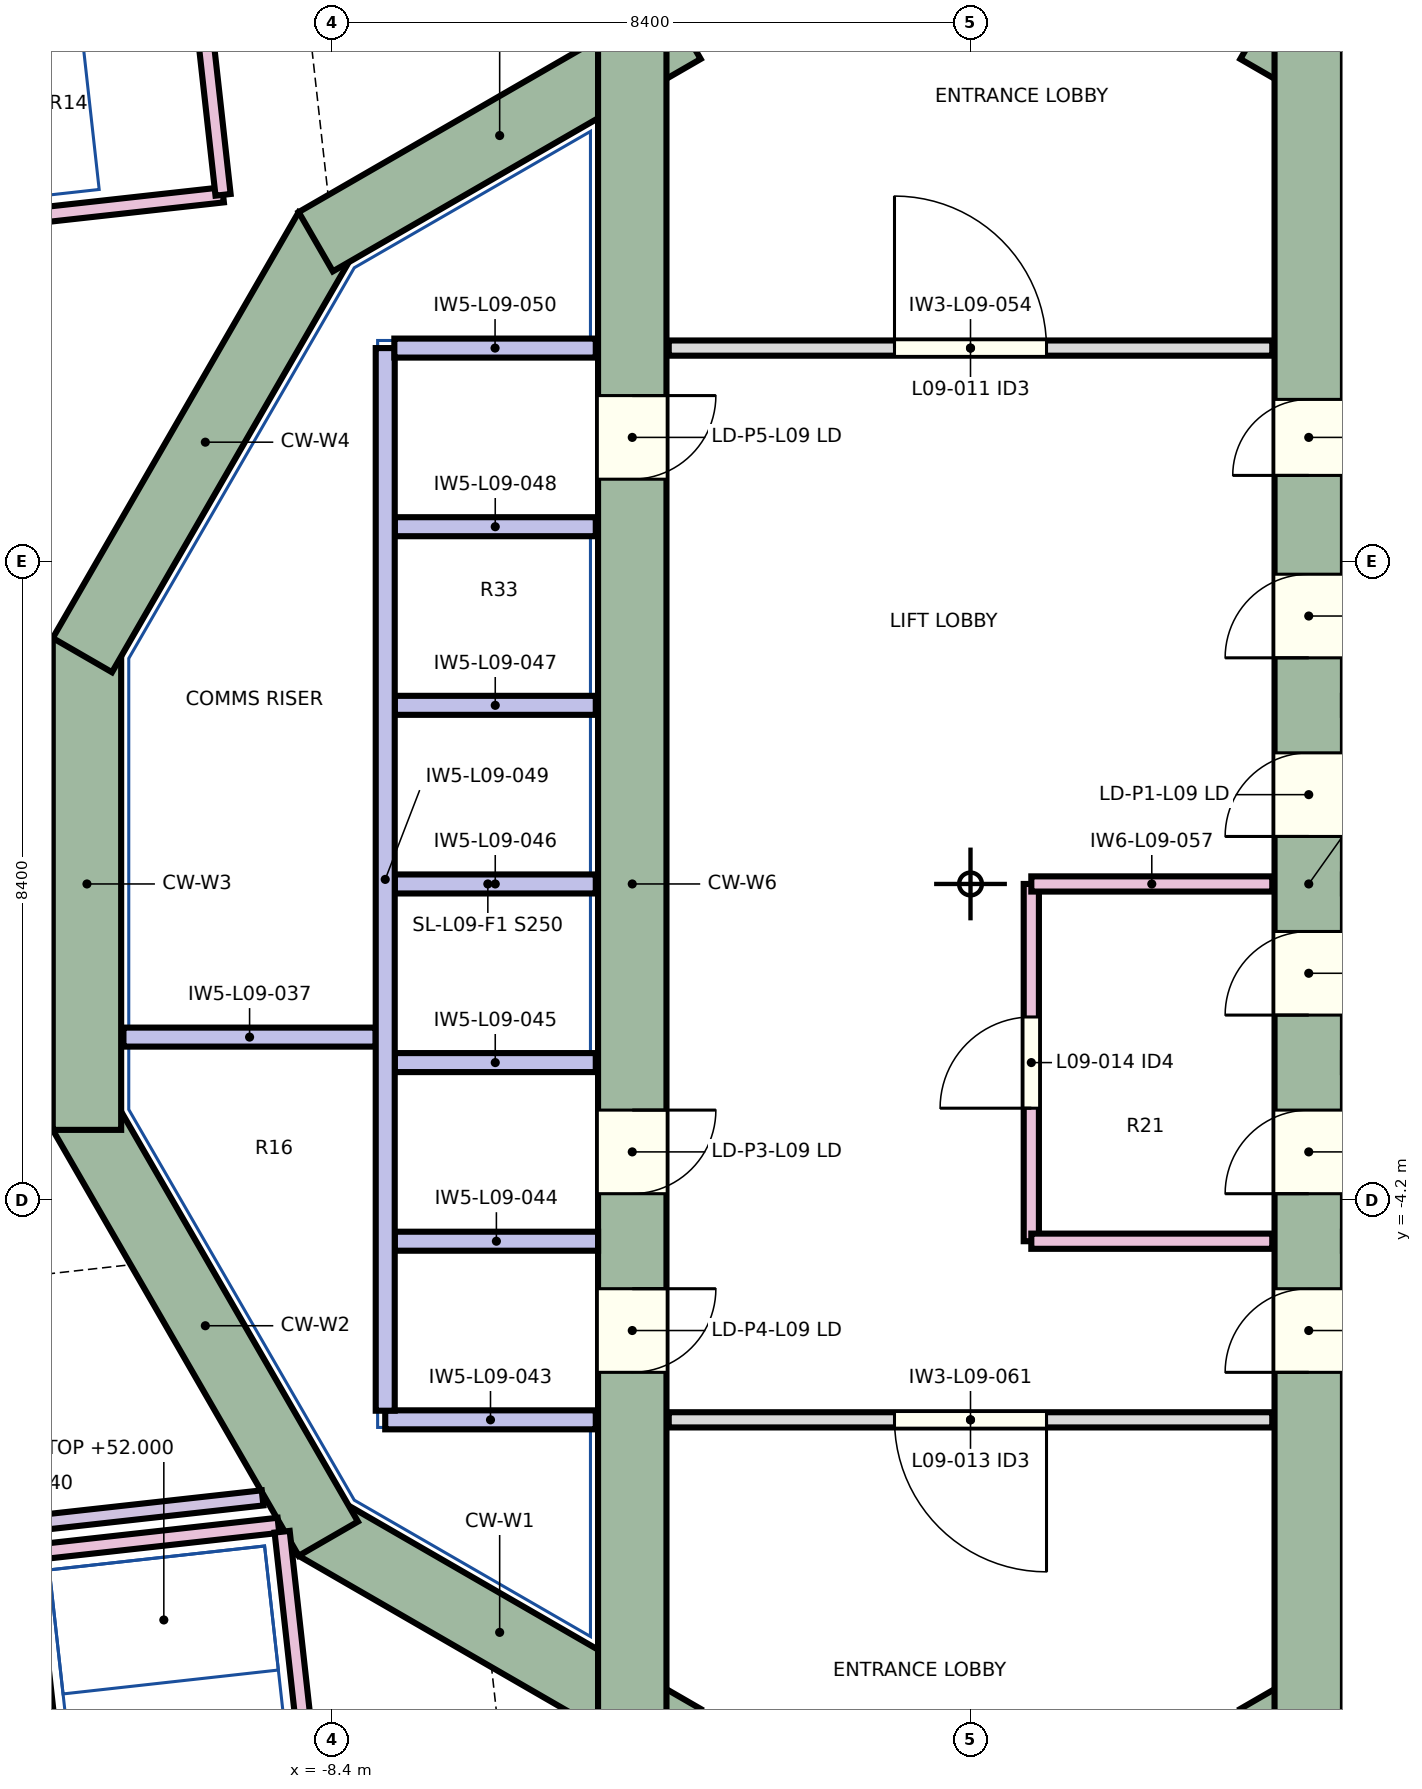
"""IFC4 building model, lengths in metres.
Left out: names, types, materials, properties, quantities, classifications, styles, units other than length and angle.
Written with IfcOpenShell. Run it as: python <this file> out.ifc"""

import sys

from ifc_helpers import new_model, si_unit, direction, frame, frame_2d, origin, place, context, subcontext, project, spatial, rectangle, extrude, element, fill, save


model = new_model("IFC4")
c1 = context("Model", 3, precision=1e-05, world=origin(), true_north=direction((0.0, 1.0)))
c2 = subcontext(c1, "Body", "Model", "MODEL_VIEW")
j1 = project(units=[si_unit("LENGTHUNIT", "METRE"), si_unit("PLANEANGLEUNIT", "RADIAN")], contexts=[c1])
p1 = place(None, origin())
s1 = spatial("IfcSite", under=j1, at=p1, CompositionType="ELEMENT")
p2 = place(p1, origin())
s2 = spatial("IfcBuilding", under=s1, at=p2, CompositionType="ELEMENT")
p3 = place(p2, frame((0.0, 0.0, 50.1)))
s3 = spatial("IfcBuildingStorey", under=s2, at=p3, CompositionType="ELEMENT", Elevation=50.1)
p4 = place(p3, frame((-3.775, -11.243, 0.0), z_axis=(0.0, 0.0, 1.0), x_axis=(-0.866026961591, 0.49999730179, 0.0)))
e1 = element("IfcWall", 1, at=p4, inside=s3, PredefinedType="SHEAR", context=c2, shape_type="SweptSolid", body=[
    extrude(rectangle(XDim=5.587, YDim=0.9, at=frame_2d((2.794, 0.0))), origin(), (0.0, 0.0, 1.0), 3.8),
])
p5 = place(p3, frame((-8.449, -8.614, 0.0), z_axis=(0.0, 0.0, 1.0), x_axis=(-0.499990282633, 0.866031014036, 0.0)))
e2 = element("IfcWall", 2, at=p5, inside=s3, PredefinedType="SHEAR", context=c2, shape_type="SweptSolid", body=[
    extrude(rectangle(XDim=6.47, YDim=0.9, at=frame_2d((3.235, 0.0))), origin(), (0.0, 0.0, 1.0), 3.8),
])
p6 = place(p3, frame((-11.624, -3.235, 0.0), z_axis=(0.0, 0.0, 1.0), x_axis=(0.0, 1.0, 0.0)))
e3 = element("IfcWall", 3, at=p6, inside=s3, PredefinedType="SHEAR", context=c2, shape_type="SweptSolid", body=[
    extrude(rectangle(XDim=6.471, YDim=0.9, at=frame_2d((3.235, 0.0))), origin(), (0.0, 0.0, 1.0), 3.8),
])
p7 = place(p3, frame((-11.684, 3.01, 0.0), z_axis=(0.0, 0.0, 1.0), x_axis=(0.499990282633, 0.866031014036, 0.0)))
e4 = element("IfcWall", 4, at=p7, inside=s3, PredefinedType="SHEAR", context=c2, shape_type="SweptSolid", body=[
    extrude(rectangle(XDim=6.47, YDim=0.9, at=frame_2d((3.235, 0.0))), origin(), (0.0, 0.0, 1.0), 3.8),
])
p8 = place(p3, frame((-8.614, 8.449, 0.0), z_axis=(0.0, 0.0, 1.0), x_axis=(0.866026961591, 0.49999730179, 0.0)))
e5 = element("IfcWall", 5, at=p8, inside=s3, PredefinedType="SHEAR", context=c2, shape_type="SweptSolid", body=[
    extrude(rectangle(XDim=5.587, YDim=0.9, at=frame_2d((2.794, 0.0))), origin(), (0.0, 0.0, 1.0), 3.8),
])
p9 = place(p3, frame((-4.45, 11.633, 0.0), z_axis=(0.0, 0.0, 1.0), x_axis=(0.0, -1.0, 0.0)))
e6 = element("IfcWall", 6, at=p9, inside=s3, PredefinedType="SHEAR", context=c2, shape_type="SweptSolid", body=[
    extrude(rectangle(XDim=23.265, YDim=0.9, at=frame_2d((11.633, 0.0))), origin(), (0.0, 0.0, 1.0), 3.8),
])
p10 = place(p9, frame((14.607, 0.0, 0.0)))
e7 = element("IfcOpeningElement", 7, at=p10, cuts=e6, PredefinedType="OPENING", context=c2, shape_type="SweptSolid", body=[
    extrude(rectangle(XDim=1.1, YDim=2.1, at=frame_2d((0.55, 1.05))), frame((0.0, 0.46, 0.0), z_axis=(0.0, -1.0, 0.0), x_axis=(1.0, 0.0, 0.0)), (0.0, 0.0, 1.0), 0.92),
])
p11 = place(p9, frame((16.958, 0.0, 0.0)))
e8 = element("IfcOpeningElement", 8, at=p11, cuts=e6, PredefinedType="OPENING", context=c2, shape_type="SweptSolid", body=[
    extrude(rectangle(XDim=1.1, YDim=2.1, at=frame_2d((0.55, 1.05))), frame((0.0, 0.46, 0.0), z_axis=(0.0, -1.0, 0.0), x_axis=(1.0, 0.0, 0.0)), (0.0, 0.0, 1.0), 0.92),
])
p12 = place(p9, frame((5.208, 0.0, 0.0)))
e9 = element("IfcOpeningElement", 9, at=p12, cuts=e6, PredefinedType="OPENING", context=c2, shape_type="SweptSolid", body=[
    extrude(rectangle(XDim=1.1, YDim=2.1, at=frame_2d((0.55, 1.05))), frame((0.0, 0.46, 0.0), z_axis=(0.0, -1.0, 0.0), x_axis=(1.0, 0.0, 0.0)), (0.0, 0.0, 1.0), 0.92),
])
for number, where, z_axis, x_axis in (
    (10, (3.775, 11.243, 0.0), (0.0, 0.0, 1.0), (0.866, -0.5, 0.0)),
    (11, (8.614, -8.449, 0.0), (0.0, 0.0, 1.0), (-0.866, -0.5, 0.0)),
):
    element("IfcWall", number, at=place(p3, frame(where, z_axis=z_axis, x_axis=x_axis)), inside=s3, PredefinedType="SHEAR", context=c2, shape_type="SweptSolid", body=[
        extrude(rectangle(XDim=5.587, YDim=0.9, at=frame_2d((2.794, 0.0))), origin(), (0.0, 0.0, 1.0), 3.8),
    ])
p13 = place(p3, frame((4.45, -11.633, 0.0), z_axis=(0.0, 0.0, 1.0), x_axis=(0.0, 1.0, 0.0)))
e12 = element("IfcWall", 12, at=p13, inside=s3, PredefinedType="SHEAR", context=c2, shape_type="SweptSolid", body=[
    extrude(rectangle(XDim=23.265, YDim=0.9, at=frame_2d((11.633, 0.0))), origin(), (0.0, 0.0, 1.0), 3.8),
])
p14 = place(p13, frame((7.558, 0.0, 0.0)))
e13 = element("IfcOpeningElement", 13, at=p14, cuts=e12, PredefinedType="OPENING", context=c2, shape_type="SweptSolid", body=[
    extrude(rectangle(XDim=1.1, YDim=2.1, at=frame_2d((0.55, 1.05))), frame((0.0, 0.46, 0.0), z_axis=(0.0, -1.0, 0.0), x_axis=(1.0, 0.0, 0.0)), (0.0, 0.0, 1.0), 0.92),
])
p15 = place(p13, frame((9.907, 0.0, 0.0)))
e14 = element("IfcOpeningElement", 14, at=p15, cuts=e12, PredefinedType="OPENING", context=c2, shape_type="SweptSolid", body=[
    extrude(rectangle(XDim=1.1, YDim=2.1, at=frame_2d((0.55, 1.05))), frame((0.0, 0.46, 0.0), z_axis=(0.0, -1.0, 0.0), x_axis=(1.0, 0.0, 0.0)), (0.0, 0.0, 1.0), 0.92),
])
p16 = place(p13, frame((12.258, 0.0, 0.0)))
e15 = element("IfcOpeningElement", 15, at=p16, cuts=e12, PredefinedType="OPENING", context=c2, shape_type="SweptSolid", body=[
    extrude(rectangle(XDim=1.1, YDim=2.1, at=frame_2d((0.55, 1.05))), frame((0.0, 0.46, 0.0), z_axis=(0.0, -1.0, 0.0), x_axis=(1.0, 0.0, 0.0)), (0.0, 0.0, 1.0), 0.92),
])
p17 = place(p13, frame((14.607, 0.0, 0.0)))
e16 = element("IfcOpeningElement", 16, at=p17, cuts=e12, PredefinedType="OPENING", context=c2, shape_type="SweptSolid", body=[
    extrude(rectangle(XDim=1.1, YDim=2.1, at=frame_2d((0.55, 1.05))), frame((0.0, 0.46, 0.0), z_axis=(0.0, -1.0, 0.0), x_axis=(1.0, 0.0, 0.0)), (0.0, 0.0, 1.0), 0.92),
])
p18 = place(p13, frame((5.208, 0.0, 0.0)))
e17 = element("IfcOpeningElement", 17, at=p18, cuts=e12, PredefinedType="OPENING", context=c2, shape_type="SweptSolid", body=[
    extrude(rectangle(XDim=1.1, YDim=2.1, at=frame_2d((0.55, 1.05))), frame((0.0, 0.46, 0.0), z_axis=(0.0, -1.0, 0.0), x_axis=(1.0, 0.0, 0.0)), (0.0, 0.0, 1.0), 0.92),
])
p19 = place(p13, frame((17.008, 0.0, 0.0)))
e18 = element("IfcOpeningElement", 18, at=p19, cuts=e12, PredefinedType="OPENING", context=c2, shape_type="SweptSolid", body=[
    extrude(rectangle(XDim=1.0, YDim=2.1, at=frame_2d((0.5, 1.05))), frame((0.0, 0.46, 0.0), z_axis=(0.0, -1.0, 0.0), x_axis=(1.0, 0.0, 0.0)), (0.0, 0.0, 1.0), 0.92),
])
p20 = place(p3, frame((-15.797, 8.404, 0.0), z_axis=(0.0, 0.0, 1.0), x_axis=(0.993897125329, 0.110310943534, 0.0)))
e19 = element("IfcWall", 19, at=p20, inside=s3, PredefinedType="SOLIDWALL", context=c2, shape_type="SweptSolid", body=[
    extrude(rectangle(XDim=6.0, YDim=0.2, at=frame_2d((3.0, 0.0))), origin(), (0.0, 0.0, 1.0), 3.55),
])
p21 = place(p3, frame((-12.396, -8.803, 0.0), z_axis=(0.0, 0.0, 1.0), x_axis=(0.110335171461, -0.993894436014, 0.0)))
e20 = element("IfcWall", 20, at=p21, inside=s3, PredefinedType="SOLIDWALL", context=c2, shape_type="SweptSolid", body=[
    extrude(rectangle(XDim=6.118, YDim=0.2, at=frame_2d((3.059, 0.0))), origin(), (0.0, 0.0, 1.0), 3.55),
])
p22 = place(p3, frame((-12.396, -8.803, 0.0), z_axis=(0.0, 0.0, 1.0), x_axis=(0.993897215684, 0.110310129436, 0.0)))
e21 = element("IfcWall", 21, at=p22, inside=s3, PredefinedType="SOLIDWALL", context=c2, shape_type="SweptSolid", body=[
    extrude(rectangle(XDim=3.311, YDim=0.2, at=frame_2d((1.656, 0.0))), origin(), (0.0, 0.0, 1.0), 3.55),
])
p23 = place(p3, frame((-11.144, -2.015, 0.0), z_axis=(0.0, 0.0, 1.0), x_axis=(1.0, 0.0, 0.0)))
e22 = element("IfcWall", 22, at=p23, inside=s3, PredefinedType="SOLIDWALL", context=c2, shape_type="SweptSolid", body=[
    extrude(rectangle(XDim=3.319, YDim=0.25, at=frame_2d((1.66, 0.0))), origin(), (0.0, 0.0, 1.0), 3.55),
])
p24 = place(p3, frame((-9.833, 9.066, 0.0), z_axis=(0.0, 0.0, 1.0), x_axis=(-0.110297715324, 0.993898593416, 0.0)))
e23 = element("IfcWall", 23, at=p24, inside=s3, PredefinedType="SOLIDWALL", context=c2, shape_type="SweptSolid", body=[
    extrude(rectangle(XDim=3.404, YDim=0.2, at=frame_2d((1.702, 0.0))), origin(), (0.0, 0.0, 1.0), 3.55),
])
p25 = place(p3, frame((-9.313, -8.077, 0.0), z_axis=(0.0, 0.0, 1.0), x_axis=(-0.993896259816, -0.110318741489, 0.0)))
e24 = element("IfcWall", 24, at=p25, inside=s3, PredefinedType="PARTITIONING", context=c2, shape_type="SweptSolid", body=[
    extrude(rectangle(XDim=6.652, YDim=0.2, at=frame_2d((3.326, 0.0))), origin(), (0.0, 0.0, 1.0), 3.55),
])
p26 = place(p3, frame((-8.391, -14.514, 0.0), z_axis=(0.0, 0.0, 1.0), x_axis=(-0.11031151838, 0.993897061527, 0.0)))
e25 = element("IfcWall", 25, at=p26, inside=s3, PredefinedType="SOLIDWALL", context=c2, shape_type="SweptSolid", body=[
    extrude(rectangle(XDim=6.029, YDim=0.2, at=frame_2d((3.014, 0.0))), origin(), (0.0, 0.0, 1.0), 3.55),
])
p27 = place(p3, frame((-7.7, -7.05, 0.0), z_axis=(0.0, 0.0, 1.0), x_axis=(1.0, 0.0, 0.0)))
e26 = element("IfcWall", 26, at=p27, inside=s3, PredefinedType="SOLIDWALL", context=c2, shape_type="SweptSolid", body=[
    extrude(rectangle(XDim=2.77, YDim=0.25, at=frame_2d((1.385, 0.0))), origin(), (0.0, 0.0, 1.0), 3.55),
])
p28 = place(p3, frame((-7.575, -4.7, 0.0), z_axis=(0.0, 0.0, 1.0), x_axis=(1.0, 0.0, 0.0)))
e27 = element("IfcWall", 27, at=p28, inside=s3, PredefinedType="SOLIDWALL", context=c2, shape_type="SweptSolid", body=[
    extrude(rectangle(XDim=2.675, YDim=0.25, at=frame_2d((1.337, 0.0))), origin(), (0.0, 0.0, 1.0), 3.55),
])
for number, where, z_axis, x_axis in (
    (28, (-7.575, -2.35, 0.0), (0.0, 0.0, 1.0), (1.0, 0.0, 0.0)),
    (29, (-7.575, 0.0, 0.0), (0.0, 0.0, 1.0), (1.0, 0.0, 0.0)),
    (30, (-7.575, 2.35, 0.0), (0.0, 0.0, 1.0), (1.0, 0.0, 0.0)),
    (31, (-7.575, 4.7, 0.0), (0.0, 0.0, 1.0), (1.0, 0.0, 0.0)),
):
    element("IfcWall", number, at=place(p3, frame(where, z_axis=z_axis, x_axis=x_axis)), inside=s3, PredefinedType="SOLIDWALL", context=c2, shape_type="SweptSolid", body=[
        extrude(rectangle(XDim=2.645, YDim=0.25, at=frame_2d((1.323, 0.0))), origin(), (0.0, 0.0, 1.0), 3.55),
    ])
p29 = place(p3, frame((-7.7, 7.05, 0.0), z_axis=(0.0, 0.0, 1.0), x_axis=(0.0, -1.0, 0.0)))
e32 = element("IfcWall", 32, at=p29, inside=s3, PredefinedType="SOLIDWALL", context=c2, shape_type="SweptSolid", body=[
    extrude(rectangle(XDim=13.98, YDim=0.25, at=frame_2d((6.99, 0.0))), origin(), (0.0, 0.0, 1.0), 3.55),
])
p30 = place(p3, frame((-4.93, 7.05, 0.0), z_axis=(0.0, 0.0, 1.0), x_axis=(-1.0, 0.0, 0.0)))
e33 = element("IfcWall", 33, at=p30, inside=s3, PredefinedType="SOLIDWALL", context=c2, shape_type="SweptSolid", body=[
    extrude(rectangle(XDim=2.65, YDim=0.25, at=frame_2d((1.325, 0.0))), origin(), (0.0, 0.0, 1.0), 3.55),
])
p31 = place(p3, frame((-3.97, 7.05, 0.0), z_axis=(0.0, 0.0, 1.0), x_axis=(1.0, 0.0, 0.0)))
e34 = element("IfcWall", 34, at=p31, inside=s3, PredefinedType="PARTITIONING", context=c2, shape_type="SweptSolid", body=[
    extrude(rectangle(XDim=7.94, YDim=0.2, at=frame_2d((3.97, 0.0))), origin(), (0.0, 0.0, 1.0), 3.55),
])
p32 = place(p31, frame((2.97, 0.0, 0.0)))
e35 = element("IfcOpeningElement", 35, at=p32, cuts=e34, PredefinedType="OPENING", context=c2, shape_type="SweptSolid", body=[
    extrude(rectangle(XDim=2.0, YDim=2.1, at=frame_2d((1.0, 1.05))), frame((0.0, 0.11, 0.0), z_axis=(0.0, -1.0, 0.0), x_axis=(1.0, 0.0, 0.0)), (0.0, 0.0, 1.0), 0.22),
])
p33 = place(p3, frame((0.8, -4.7, 0.0), z_axis=(0.0, 0.0, 1.0), x_axis=(0.0, 1.0, 0.0)))
e36 = element("IfcWall", 36, at=p33, inside=s3, PredefinedType="SOLIDWALL", context=c2, shape_type="SweptSolid", body=[
    extrude(rectangle(XDim=4.7, YDim=0.2, at=frame_2d((2.35, 0.0))), origin(), (0.0, 0.0, 1.0), 3.55),
])
p34 = place(p33, frame((1.75, 0.0, 0.0)))
e37 = element("IfcOpeningElement", 37, at=p34, cuts=e36, PredefinedType="OPENING", context=c2, shape_type="SweptSolid", body=[
    extrude(rectangle(XDim=1.2, YDim=2.1, at=frame_2d((0.6, 1.05))), frame((0.0, 0.11, 0.0), z_axis=(0.0, -1.0, 0.0), x_axis=(1.0, 0.0, 0.0)), (0.0, 0.0, 1.0), 0.22),
])
p35 = place(p3, frame((0.8, 0.0, 0.0), z_axis=(0.0, 0.0, 1.0), x_axis=(1.0, 0.0, 0.0)))
e38 = element("IfcWall", 38, at=p35, inside=s3, PredefinedType="SOLIDWALL", context=c2, shape_type="SweptSolid", body=[
    extrude(rectangle(XDim=3.17, YDim=0.2, at=frame_2d((1.585, 0.0))), origin(), (0.0, 0.0, 1.0), 3.55),
])
p36 = place(p3, frame((3.97, -7.05, 0.0), z_axis=(0.0, 0.0, 1.0), x_axis=(-1.0, 0.0, 0.0)))
e39 = element("IfcWall", 39, at=p36, inside=s3, PredefinedType="PARTITIONING", context=c2, shape_type="SweptSolid", body=[
    extrude(rectangle(XDim=7.94, YDim=0.2, at=frame_2d((3.97, 0.0))), origin(), (0.0, 0.0, 1.0), 3.55),
])
p37 = place(p36, frame((2.97, 0.0, 0.0)))
e40 = element("IfcOpeningElement", 40, at=p37, cuts=e39, PredefinedType="OPENING", context=c2, shape_type="SweptSolid", body=[
    extrude(rectangle(XDim=2.0, YDim=2.1, at=frame_2d((1.0, 1.05))), frame((0.0, 0.11, 0.0), z_axis=(0.0, -1.0, 0.0), x_axis=(1.0, 0.0, 0.0)), (0.0, 0.0, 1.0), 0.22),
])
p38 = place(p3, frame((3.97, -4.7, 0.0), z_axis=(0.0, 0.0, 1.0), x_axis=(-1.0, 0.0, 0.0)))
e41 = element("IfcWall", 41, at=p38, inside=s3, PredefinedType="SOLIDWALL", context=c2, shape_type="SweptSolid", body=[
    extrude(rectangle(XDim=3.17, YDim=0.2, at=frame_2d((1.585, 0.0))), origin(), (0.0, 0.0, 1.0), 3.55),
])
for number, where, z_axis, x_axis in (
    (42, (4.9, -4.7, 0.0), (0.0, 0.0, 1.0), (1.0, 0.0, 0.0)),
    (43, (4.9, 0.0, 0.0), (0.0, 0.0, 1.0), (1.0, 0.0, 0.0)),
):
    element("IfcWall", number, at=place(p3, frame(where, z_axis=z_axis, x_axis=x_axis)), inside=s3, PredefinedType="SOLIDWALL", context=c2, shape_type="SweptSolid", body=[
        extrude(rectangle(XDim=2.675, YDim=0.25, at=frame_2d((1.337, 0.0))), origin(), (0.0, 0.0, 1.0), 3.55),
    ])
p39 = place(p32, origin())
e44 = element("IfcDoor", 44, at=p39, inside=s3, OperationType="NOTDEFINED", PredefinedType="DOOR", context=c2, shape_type="SweptSolid", body=[
    extrude(rectangle(XDim=2.0, YDim=2.1, at=frame_2d((1.0, 1.05))), frame((0.0, 0.025, 0.0), z_axis=(0.0, -1.0, 0.0), x_axis=(1.0, 0.0, 0.0)), (0.0, 0.0, 1.0), 0.05),
])
fill(e35, e44)
p40 = place(p37, origin())
e45 = element("IfcDoor", 45, at=p40, inside=s3, OperationType="NOTDEFINED", PredefinedType="DOOR", context=c2, shape_type="SweptSolid", body=[
    extrude(rectangle(XDim=2.0, YDim=2.1, at=frame_2d((1.0, 1.05))), frame((0.0, 0.025, 0.0), z_axis=(0.0, -1.0, 0.0), x_axis=(1.0, 0.0, 0.0)), (0.0, 0.0, 1.0), 0.05),
])
fill(e40, e45)
p41 = place(p34, origin())
e46 = element("IfcDoor", 46, at=p41, inside=s3, OperationType="NOTDEFINED", PredefinedType="DOOR", context=c2, shape_type="SweptSolid", body=[
    extrude(rectangle(XDim=1.2, YDim=2.1, at=frame_2d((0.6, 1.05))), frame((0.0, 0.025, 0.0), z_axis=(0.0, -1.0, 0.0), x_axis=(1.0, 0.0, 0.0)), (0.0, 0.0, 1.0), 0.05),
])
fill(e37, e46)
p42 = place(p14, origin())
e47 = element("IfcDoor", 47, at=p42, inside=s3, OperationType="SLIDING_TO_LEFT", PredefinedType="DOOR", context=c2, shape_type="SweptSolid", body=[
    extrude(rectangle(XDim=1.1, YDim=2.1, at=frame_2d((0.55, 1.05))), frame((0.0, 0.025, 0.0), z_axis=(0.0, -1.0, 0.0), x_axis=(1.0, 0.0, 0.0)), (0.0, 0.0, 1.0), 0.05),
])
fill(e13, e47)
p43 = place(p15, origin())
e48 = element("IfcDoor", 48, at=p43, inside=s3, OperationType="SLIDING_TO_LEFT", PredefinedType="DOOR", context=c2, shape_type="SweptSolid", body=[
    extrude(rectangle(XDim=1.1, YDim=2.1, at=frame_2d((0.55, 1.05))), frame((0.0, 0.025, 0.0), z_axis=(0.0, -1.0, 0.0), x_axis=(1.0, 0.0, 0.0)), (0.0, 0.0, 1.0), 0.05),
])
fill(e14, e48)
p44 = place(p16, origin())
e49 = element("IfcDoor", 49, at=p44, inside=s3, OperationType="SLIDING_TO_LEFT", PredefinedType="DOOR", context=c2, shape_type="SweptSolid", body=[
    extrude(rectangle(XDim=1.1, YDim=2.1, at=frame_2d((0.55, 1.05))), frame((0.0, 0.025, 0.0), z_axis=(0.0, -1.0, 0.0), x_axis=(1.0, 0.0, 0.0)), (0.0, 0.0, 1.0), 0.05),
])
fill(e15, e49)
p45 = place(p17, origin())
e50 = element("IfcDoor", 50, at=p45, inside=s3, OperationType="SLIDING_TO_LEFT", PredefinedType="DOOR", context=c2, shape_type="SweptSolid", body=[
    extrude(rectangle(XDim=1.1, YDim=2.1, at=frame_2d((0.55, 1.05))), frame((0.0, 0.025, 0.0), z_axis=(0.0, -1.0, 0.0), x_axis=(1.0, 0.0, 0.0)), (0.0, 0.0, 1.0), 0.05),
])
fill(e16, e50)
p46 = place(p10, origin())
e51 = element("IfcDoor", 51, at=p46, inside=s3, OperationType="SLIDING_TO_LEFT", PredefinedType="DOOR", context=c2, shape_type="SweptSolid", body=[
    extrude(rectangle(XDim=1.1, YDim=2.1, at=frame_2d((0.55, 1.05))), frame((0.0, 0.025, 0.0), z_axis=(0.0, -1.0, 0.0), x_axis=(1.0, 0.0, 0.0)), (0.0, 0.0, 1.0), 0.05),
])
fill(e7, e51)
p47 = place(p11, origin())
e52 = element("IfcDoor", 52, at=p47, inside=s3, OperationType="SLIDING_TO_LEFT", PredefinedType="DOOR", context=c2, shape_type="SweptSolid", body=[
    extrude(rectangle(XDim=1.1, YDim=2.1, at=frame_2d((0.55, 1.05))), frame((0.0, 0.025, 0.0), z_axis=(0.0, -1.0, 0.0), x_axis=(1.0, 0.0, 0.0)), (0.0, 0.0, 1.0), 0.05),
])
fill(e8, e52)
p48 = place(p12, origin())
e53 = element("IfcDoor", 53, at=p48, inside=s3, OperationType="SLIDING_TO_LEFT", PredefinedType="DOOR", context=c2, shape_type="SweptSolid", body=[
    extrude(rectangle(XDim=1.1, YDim=2.1, at=frame_2d((0.55, 1.05))), frame((0.0, 0.025, 0.0), z_axis=(0.0, -1.0, 0.0), x_axis=(1.0, 0.0, 0.0)), (0.0, 0.0, 1.0), 0.05),
])
fill(e9, e53)
p49 = place(p18, origin())
e54 = element("IfcDoor", 54, at=p49, inside=s3, OperationType="SLIDING_TO_LEFT", PredefinedType="DOOR", context=c2, shape_type="SweptSolid", body=[
    extrude(rectangle(XDim=1.1, YDim=2.1, at=frame_2d((0.55, 1.05))), frame((0.0, 0.025, 0.0), z_axis=(0.0, -1.0, 0.0), x_axis=(1.0, 0.0, 0.0)), (0.0, 0.0, 1.0), 0.05),
])
fill(e17, e54)
p50 = place(p19, origin())
e55 = element("IfcDoor", 55, at=p50, inside=s3, OperationType="NOTDEFINED", PredefinedType="DOOR", context=c2, shape_type="SweptSolid", body=[
    extrude(rectangle(XDim=1.0, YDim=2.1, at=frame_2d((0.5, 1.05))), frame((0.0, 0.025, 0.0), z_axis=(0.0, -1.0, 0.0), x_axis=(1.0, 0.0, 0.0)), (0.0, 0.0, 1.0), 0.05),
])
fill(e18, e55)
save(model, sys.argv[1])
